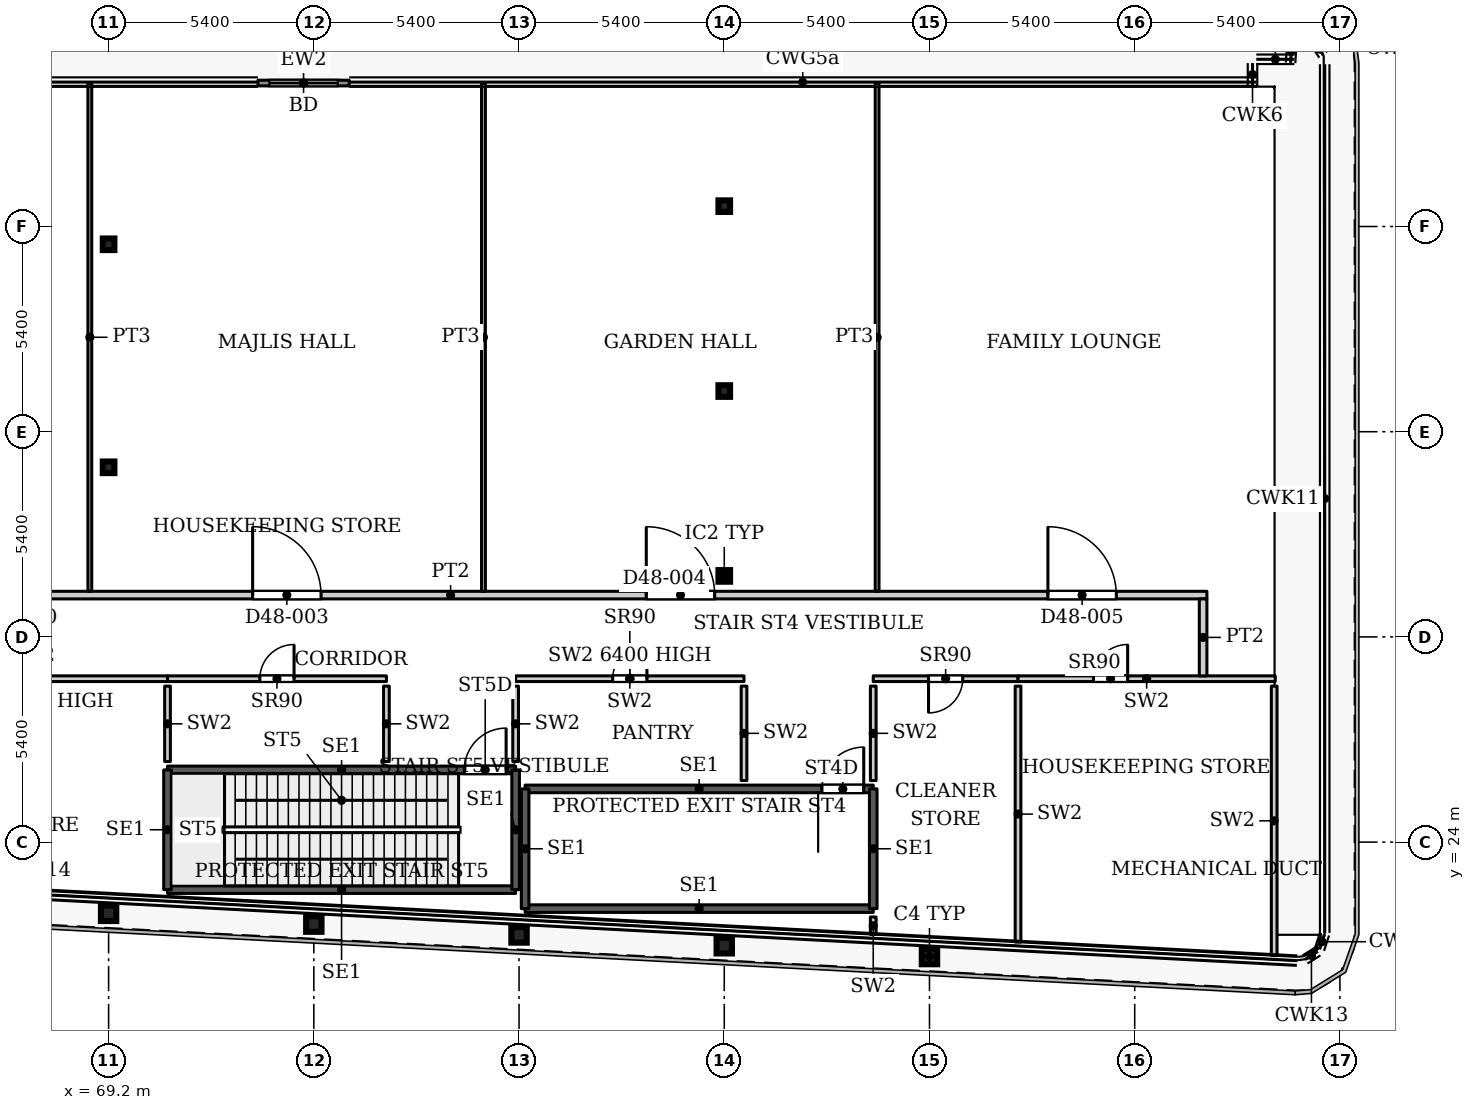
"""IFC4 building model, lengths in metres.
Left out: names, types, materials, properties, quantities, classifications, styles, units other than length and angle.
Written with IfcOpenShell. Run it as: python <this file> out.ifc"""

import sys

from ifc_helpers import new_model, si_unit, direction, frame, frame_2d, origin, origin_2d, place, context, subcontext, project, spatial, rectangle, hollow_rectangle, i_section, extrude, source, transform, mapped, element, fill, save


model = new_model("IFC4")
c1 = context("Model", 3, precision=1e-05, world=origin(), true_north=direction((0.0, 1.0)))
c2 = subcontext(c1, "Body", "Model", "MODEL_VIEW")
j1 = project(units=[si_unit("LENGTHUNIT", "METRE"), si_unit("PLANEANGLEUNIT", "RADIAN")], contexts=[c1])
p1 = place(None, origin())
s1 = spatial("IfcSite", under=j1, at=p1, CompositionType="ELEMENT")
p2 = place(p1, origin())
s2 = spatial("IfcBuilding", under=s1, at=p2, CompositionType="ELEMENT")
p3 = place(p2, frame((0.0, 0.0, 203.3)))
s3 = spatial("IfcBuildingStorey", under=s2, at=p3, CompositionType="ELEMENT", Elevation=203.3)
for number, where, z_axis, x_axis in (
    (1, (90.8, 20.99, 0.0), (0.0, 0.0, 1.0), (1.0, 0.0, 0.0)),
    (2, (85.4, 21.274, 0.0), (0.0, 0.0, 1.0), (1.0, 0.0, 0.0)),
    (3, (80.0, 21.558, 0.0), (0.0, 0.0, 1.0), (1.0, 0.0, 0.0)),
    (4, (74.6, 21.843, 0.0), (0.0, 0.0, 1.0), (1.0, 0.0, 0.0)),
    (5, (69.2, 22.127, 0.0), (0.0, 0.0, 1.0), (1.0, 0.0, 0.0)),
):
    element("IfcColumn", number, at=place(p3, frame(where, z_axis=z_axis, x_axis=x_axis)), inside=s3, PredefinedType="COLUMN", context=c2, shape_type="SweptSolid", body=[
        extrude(i_section(OverallWidth=0.404, OverallDepth=0.407, WebThickness=0.027, FlangeThickness=0.044, FilletRadius=0.012, at=origin_2d()), origin(), (0.0, 0.0, 1.0), 7.8),
    ])
for number, where, z_axis, x_axis in (
    (6, (85.4, 31.005, 0.0), (0.0, 0.0, 1.0), (1.0, 0.0, 0.0)),
    (7, (69.2, 33.863, 0.0), (0.0, 0.0, 1.0), (1.0, 0.0, 0.0)),
    (8, (85.4, 35.87, 0.0), (0.0, 0.0, 1.0), (1.0, 0.0, 0.0)),
    (9, (69.2, 39.732, 0.0), (0.0, 0.0, 1.0), (1.0, 0.0, 0.0)),
    (10, (85.4, 40.735, 0.0), (0.0, 0.0, 1.0), (1.0, 0.0, 0.0)),
):
    element("IfcColumn", number, at=place(p3, frame(where, z_axis=z_axis, x_axis=x_axis)), inside=s3, PredefinedType="COLUMN", context=c2, shape_type="SweptSolid", body=[
        extrude(hollow_rectangle(XDim=0.305, YDim=0.305, WallThickness=0.016, InnerFilletRadius=0.016, OuterFilletRadius=0.032, at=origin_2d()), origin(), (0.0, 0.0, 1.0), 7.8),
    ])
p4 = place(p3, frame((73.13, 43.975, 0.0), z_axis=(0.0, 0.0, 1.0), x_axis=(1.0, 0.0, 0.0)))
e11 = element("IfcWall", 11, at=p4, inside=s3, PredefinedType="SOLIDWALL", context=c2, shape_type="SweptSolid", body=[
    extrude(rectangle(XDim=2.4, YDim=0.15, at=frame_2d((1.2, 0.0))), origin(), (0.0, 0.0, 1.0), 7.65),
])
p5 = place(p4, frame((0.3, 0.0, 0.0)))
e12 = element("IfcOpeningElement", 12, at=p5, cuts=e11, PredefinedType="OPENING", context=c2, shape_type="SweptSolid", body=[
    extrude(rectangle(XDim=1.8, YDim=2.4, at=frame_2d((0.9, 1.2))), frame((0.0, 0.085, 0.0), z_axis=(0.0, -1.0, 0.0), x_axis=(1.0, 0.0, 0.0)), (0.0, 0.0, 1.0), 0.17),
])
p6 = place(p3, frame((80.16, 22.25, 0.0), z_axis=(0.0, 0.0, 1.0), x_axis=(1.0, 0.0, 0.0)))
e13 = element("IfcWall", 13, at=p6, inside=s3, PredefinedType="SHEAR", context=c2, shape_type="SweptSolid", body=[
    extrude(rectangle(XDim=9.16, YDim=0.2, at=frame_2d((4.58, 0.0))), origin(), (0.0, 0.0, 1.0), 7.8),
])
p7 = place(p3, frame((80.16, 25.4, 0.0), z_axis=(0.0, 0.0, 1.0), x_axis=(1.0, 0.0, 0.0)))
e14 = element("IfcWall", 14, at=p7, inside=s3, PredefinedType="SHEAR", context=c2, shape_type="SweptSolid", body=[
    extrude(rectangle(XDim=9.16, YDim=0.2, at=frame_2d((4.58, 0.0))), origin(), (0.0, 0.0, 1.0), 7.8),
])
p8 = place(p7, frame((7.81, 0.0, 0.0)))
e15 = element("IfcOpeningElement", 15, at=p8, cuts=e14, PredefinedType="OPENING", context=c2, shape_type="SweptSolid", body=[
    extrude(rectangle(XDim=1.1, YDim=2.2, at=frame_2d((0.55, 1.1))), frame((0.0, 0.11, 0.0), z_axis=(0.0, -1.0, 0.0), x_axis=(1.0, 0.0, 0.0)), (0.0, 0.0, 1.0), 0.22),
])
for number, where, z_axis, x_axis in (
    (16, (80.16, 22.25, 0.0), (0.0, 0.0, 1.0), (0.0, 1.0, 0.0)),
    (17, (89.32, 22.25, 0.0), (0.0, 0.0, 1.0), (0.0, 1.0, 0.0)),
):
    element("IfcWall", number, at=place(p3, frame(where, z_axis=z_axis, x_axis=x_axis)), inside=s3, PredefinedType="SHEAR", context=c2, shape_type="SweptSolid", body=[
        extrude(rectangle(XDim=3.15, YDim=0.2, at=frame_2d((1.575, 0.0))), origin(), (0.0, 0.0, 1.0), 7.8),
    ])
p9 = place(p3, frame((70.75, 22.75, 0.0), z_axis=(0.0, 0.0, 1.0), x_axis=(1.0, 0.0, 0.0)))
e18 = element("IfcWall", 18, at=p9, inside=s3, PredefinedType="SHEAR", context=c2, shape_type="SweptSolid", body=[
    extrude(rectangle(XDim=9.16, YDim=0.2, at=frame_2d((4.58, 0.0))), origin(), (0.0, 0.0, 1.0), 7.8),
])
p10 = place(p3, frame((70.75, 25.9, 0.0), z_axis=(0.0, 0.0, 1.0), x_axis=(1.0, 0.0, 0.0)))
e19 = element("IfcWall", 19, at=p10, inside=s3, PredefinedType="SHEAR", context=c2, shape_type="SweptSolid", body=[
    extrude(rectangle(XDim=9.16, YDim=0.2, at=frame_2d((4.58, 0.0))), origin(), (0.0, 0.0, 1.0), 7.8),
])
p11 = place(p10, frame((7.81, 0.0, 0.0)))
e20 = element("IfcOpeningElement", 20, at=p11, cuts=e19, PredefinedType="OPENING", context=c2, shape_type="SweptSolid", body=[
    extrude(rectangle(XDim=1.1, YDim=2.2, at=frame_2d((0.55, 1.1))), frame((0.0, 0.11, 0.0), z_axis=(0.0, -1.0, 0.0), x_axis=(1.0, 0.0, 0.0)), (0.0, 0.0, 1.0), 0.22),
])
for number, where, z_axis, x_axis in (
    (21, (70.75, 22.75, 0.0), (0.0, 0.0, 1.0), (0.0, 1.0, 0.0)),
    (22, (79.91, 22.75, 0.0), (0.0, 0.0, 1.0), (0.0, 1.0, 0.0)),
):
    element("IfcWall", number, at=place(p3, frame(where, z_axis=z_axis, x_axis=x_axis)), inside=s3, PredefinedType="SHEAR", context=c2, shape_type="SweptSolid", body=[
        extrude(rectangle(XDim=3.15, YDim=0.2, at=frame_2d((1.575, 0.0))), origin(), (0.0, 0.0, 1.0), 7.8),
    ])
p12 = place(p3, frame((63.611, 28.3, 0.0), z_axis=(0.0, 0.0, 1.0), x_axis=(1.0, 0.0, 0.0)))
e23 = element("IfcWall", 23, at=p12, inside=s3, PredefinedType="PARTITIONING", context=c2, shape_type="SweptSolid", body=[
    extrude(rectangle(XDim=7.139, YDim=0.15, at=frame_2d((3.569, 0.0))), origin(), (0.0, 0.0, 1.0), 6.897),
])
p13 = place(p12, frame((3.119, 0.0, 0.0)))
e24 = element("IfcOpeningElement", 24, at=p13, cuts=e23, PredefinedType="OPENING", context=c2, shape_type="SweptSolid", body=[
    extrude(rectangle(XDim=0.9, YDim=2.2, at=frame_2d((0.45, 1.1))), frame((0.0, 0.085, 0.0), z_axis=(0.0, -1.0, 0.0), x_axis=(1.0, 0.0, 0.0)), (0.0, 0.0, 1.0), 0.17),
])
p14 = place(p3, frame((70.75, 26.12, 0.0), z_axis=(0.0, 0.0, 1.0), x_axis=(0.0, 1.0, 0.0)))
e25 = element("IfcWall", 25, at=p14, inside=s3, PredefinedType="PARTITIONING", context=c2, shape_type="SweptSolid", body=[
    extrude(rectangle(XDim=1.985, YDim=0.15, at=frame_2d((0.992, 0.0))), origin(), (0.0, 0.0, 1.0), 7.8),
])
p15 = place(p3, frame((70.75, 28.3, 0.0), z_axis=(0.0, 0.0, 1.0), x_axis=(1.0, 0.0, 0.0)))
e26 = element("IfcWall", 26, at=p15, inside=s3, PredefinedType="PARTITIONING", context=c2, shape_type="SweptSolid", body=[
    extrude(rectangle(XDim=5.76, YDim=0.15, at=frame_2d((2.88, 0.0))), origin(), (0.0, 0.0, 1.0), 7.8),
])
p16 = place(p15, frame((2.43, 0.0, 0.0)))
e27 = element("IfcOpeningElement", 27, at=p16, cuts=e26, PredefinedType="OPENING", context=c2, shape_type="SweptSolid", body=[
    extrude(rectangle(XDim=0.9, YDim=2.2, at=frame_2d((0.45, 1.1))), frame((0.0, 0.085, 0.0), z_axis=(0.0, -1.0, 0.0), x_axis=(1.0, 0.0, 0.0)), (0.0, 0.0, 1.0), 0.17),
])
p17 = place(p3, frame((76.51, 26.12, 0.0), z_axis=(0.0, 0.0, 1.0), x_axis=(0.0, 1.0, 0.0)))
e28 = element("IfcWall", 28, at=p17, inside=s3, PredefinedType="PARTITIONING", context=c2, shape_type="SweptSolid", body=[
    extrude(rectangle(XDim=1.985, YDim=0.15, at=frame_2d((0.992, 0.0))), origin(), (0.0, 0.0, 1.0), 7.8),
])
p18 = place(p3, frame((79.91, 28.3, 0.0), z_axis=(0.0, 0.0, 1.0), x_axis=(1.0, 0.0, 0.0)))
e29 = element("IfcWall", 29, at=p18, inside=s3, PredefinedType="PARTITIONING", context=c2, shape_type="SweptSolid", body=[
    extrude(rectangle(XDim=6.01, YDim=0.15, at=frame_2d((3.005, 0.0))), origin(), (0.0, 0.0, 1.0), 6.4),
])
p19 = place(p18, frame((2.555, 0.0, 0.0)))
e30 = element("IfcOpeningElement", 30, at=p19, cuts=e29, PredefinedType="OPENING", context=c2, shape_type="SweptSolid", body=[
    extrude(rectangle(XDim=0.9, YDim=2.2, at=frame_2d((0.45, 1.1))), frame((0.0, 0.085, 0.0), z_axis=(0.0, -1.0, 0.0), x_axis=(1.0, 0.0, 0.0)), (0.0, 0.0, 1.0), 0.17),
])
p20 = place(p3, frame((79.91, 26.12, 0.0), z_axis=(0.0, 0.0, 1.0), x_axis=(0.0, 1.0, 0.0)))
e31 = element("IfcWall", 31, at=p20, inside=s3, PredefinedType="PARTITIONING", context=c2, shape_type="SweptSolid", body=[
    extrude(rectangle(XDim=1.985, YDim=0.15, at=frame_2d((0.992, 0.0))), origin(), (0.0, 0.0, 1.0), 7.8),
])
p21 = place(p3, frame((85.92, 25.62, 0.0), z_axis=(0.0, 0.0, 1.0), x_axis=(0.0, 1.0, 0.0)))
e32 = element("IfcWall", 32, at=p21, inside=s3, PredefinedType="PARTITIONING", context=c2, shape_type="SweptSolid", body=[
    extrude(rectangle(XDim=2.485, YDim=0.15, at=frame_2d((1.242, 0.0))), origin(), (0.0, 0.0, 1.0), 7.8),
])
p22 = place(p3, frame((89.32, 28.3, 0.0), z_axis=(0.0, 0.0, 1.0), x_axis=(1.0, 0.0, 0.0)))
e33 = element("IfcWall", 33, at=p22, inside=s3, PredefinedType="PARTITIONING", context=c2, shape_type="SweptSolid", body=[
    extrude(rectangle(XDim=3.81, YDim=0.15, at=frame_2d((1.905, 0.0))), origin(), (0.0, 0.0, 1.0), 7.8),
])
p23 = place(p22, frame((1.455, 0.0, 0.0)))
e34 = element("IfcOpeningElement", 34, at=p23, cuts=e33, PredefinedType="OPENING", context=c2, shape_type="SweptSolid", body=[
    extrude(rectangle(XDim=0.9, YDim=2.2, at=frame_2d((0.45, 1.1))), frame((0.0, 0.085, 0.0), z_axis=(0.0, -1.0, 0.0), x_axis=(1.0, 0.0, 0.0)), (0.0, 0.0, 1.0), 0.17),
])
p24 = place(p3, frame((89.32, 21.571, 0.0), z_axis=(0.0, 0.0, 1.0), x_axis=(0.0, 1.0, 0.0)))
e35 = element("IfcWall", 35, at=p24, inside=s3, PredefinedType="PARTITIONING", context=c2, shape_type="SweptSolid", body=[
    extrude(rectangle(XDim=0.459, YDim=0.15, at=frame_2d((0.229, 0.0))), origin(), (0.0, 0.0, 1.0), 7.8),
])
p25 = place(p3, frame((89.32, 25.62, 0.0), z_axis=(0.0, 0.0, 1.0), x_axis=(0.0, 1.0, 0.0)))
e36 = element("IfcWall", 36, at=p25, inside=s3, PredefinedType="PARTITIONING", context=c2, shape_type="SweptSolid", body=[
    extrude(rectangle(XDim=2.485, YDim=0.15, at=frame_2d((1.242, 0.0))), origin(), (0.0, 0.0, 1.0), 7.8),
])
p26 = place(p3, frame((93.13, 21.37, 0.0), z_axis=(0.0, 0.0, 1.0), x_axis=(0.0, 1.0, 0.0)))
e37 = element("IfcWall", 37, at=p26, inside=s3, PredefinedType="PARTITIONING", context=c2, shape_type="SweptSolid", body=[
    extrude(rectangle(XDim=6.735, YDim=0.15, at=frame_2d((3.367, 0.0))), origin(), (0.0, 0.0, 1.0), 7.8),
])
p27 = place(p3, frame((93.13, 28.3, 0.0), z_axis=(0.0, 0.0, 1.0), x_axis=(1.0, 0.0, 0.0)))
e38 = element("IfcWall", 38, at=p27, inside=s3, PredefinedType="PARTITIONING", context=c2, shape_type="SweptSolid", body=[
    extrude(rectangle(XDim=6.768, YDim=0.15, at=frame_2d((3.384, 0.0))), origin(), (0.0, 0.0, 1.0), 7.8),
])
p28 = place(p27, frame((1.985, 0.0, 0.0)))
e39 = element("IfcOpeningElement", 39, at=p28, cuts=e38, PredefinedType="OPENING", context=c2, shape_type="SweptSolid", body=[
    extrude(rectangle(XDim=0.9, YDim=2.2, at=frame_2d((0.45, 1.1))), frame((0.0, 0.085, 0.0), z_axis=(0.0, -1.0, 0.0), x_axis=(1.0, 0.0, 0.0)), (0.0, 0.0, 1.0), 0.17),
])
p29 = place(p3, frame((99.87, 21.015, 0.0), z_axis=(0.0, 0.0, 1.0), x_axis=(0.0, 1.0, 0.0)))
e40 = element("IfcWall", 40, at=p29, inside=s3, PredefinedType="PARTITIONING", context=c2, shape_type="SweptSolid", body=[
    extrude(rectangle(XDim=7.09, YDim=0.15, at=frame_2d((3.545, 0.0))), origin(), (0.0, 0.0, 1.0), 7.8),
])
p30 = place(p3, frame((58.298, 30.5, 0.0), z_axis=(0.0, 0.0, 1.0), x_axis=(1.0, 0.0, 0.0)))
e41 = element("IfcWall", 41, at=p30, inside=s3, PredefinedType="PARTITIONING", context=c2, shape_type="SweptSolid", body=[
    extrude(rectangle(XDim=39.802, YDim=0.2, at=frame_2d((19.901, 0.0))), origin(), (0.0, 0.0, 1.0), 7.5),
])
p31 = place(p30, frame((4.334, 0.0, 0.0)))
e42 = element("IfcOpeningElement", 42, at=p31, cuts=e41, PredefinedType="OPENING", context=c2, shape_type="SweptSolid", body=[
    extrude(rectangle(XDim=1.8, YDim=2.1, at=frame_2d((0.9, 1.05))), frame((0.0, 0.11, 0.0), z_axis=(0.0, -1.0, 0.0), x_axis=(1.0, 0.0, 0.0)), (0.0, 0.0, 1.0), 0.22),
])
p32 = place(p30, frame((14.692, 0.0, 0.0)))
e43 = element("IfcOpeningElement", 43, at=p32, cuts=e41, PredefinedType="OPENING", context=c2, shape_type="SweptSolid", body=[
    extrude(rectangle(XDim=1.8, YDim=2.1, at=frame_2d((0.9, 1.05))), frame((0.0, 0.11, 0.0), z_axis=(0.0, -1.0, 0.0), x_axis=(1.0, 0.0, 0.0)), (0.0, 0.0, 1.0), 0.22),
])
p33 = place(p30, frame((25.05, 0.0, 0.0)))
e44 = element("IfcOpeningElement", 44, at=p33, cuts=e41, PredefinedType="OPENING", context=c2, shape_type="SweptSolid", body=[
    extrude(rectangle(XDim=1.8, YDim=2.1, at=frame_2d((0.9, 1.05))), frame((0.0, 0.11, 0.0), z_axis=(0.0, -1.0, 0.0), x_axis=(1.0, 0.0, 0.0)), (0.0, 0.0, 1.0), 0.22),
])
p34 = place(p30, frame((35.618, 0.0, 0.0)))
e45 = element("IfcOpeningElement", 45, at=p34, cuts=e41, PredefinedType="OPENING", context=c2, shape_type="SweptSolid", body=[
    extrude(rectangle(XDim=1.8, YDim=2.1, at=frame_2d((0.9, 1.05))), frame((0.0, 0.11, 0.0), z_axis=(0.0, -1.0, 0.0), x_axis=(1.0, 0.0, 0.0)), (0.0, 0.0, 1.0), 0.22),
])
for number, where, z_axis, x_axis in (
    (46, (68.706, 30.6, 0.0), (0.0, 0.0, 1.0), (0.0, 1.0, 0.0)),
    (47, (79.064, 30.6, 0.0), (0.0, 0.0, 1.0), (0.0, 1.0, 0.0)),
    (48, (89.422, 30.6, 0.0), (0.0, 0.0, 1.0), (0.0, 1.0, 0.0)),
):
    element("IfcWall", number, at=place(p3, frame(where, z_axis=z_axis, x_axis=x_axis)), inside=s3, PredefinedType="PARTITIONING", context=c2, shape_type="SweptSolid", body=[
        extrude(rectangle(XDim=13.37, YDim=0.1, at=frame_2d((6.685, 0.0))), origin(), (0.0, 0.0, 1.0), 7.5),
    ])
p35 = place(p3, frame((98.0, 28.374, 0.0), z_axis=(0.0, 0.0, 1.0), x_axis=(0.0, 1.0, 0.0)))
e49 = element("IfcWall", 49, at=p35, inside=s3, PredefinedType="PARTITIONING", context=c2, shape_type="SweptSolid", body=[
    extrude(rectangle(XDim=2.026, YDim=0.2, at=frame_2d((1.013, 0.0))), origin(), (0.0, 0.0, 1.0), 7.5),
])
m1 = source(origin(), c2, "Body", "SweptSolid", [
    extrude(rectangle(XDim=1.8, YDim=2.4, at=frame_2d((0.9, 1.2))), frame((0.0, 0.025, 0.0), z_axis=(0.0, -1.0, 0.0), x_axis=(1.0, 0.0, 0.0)), (0.0, 0.0, 1.0), 0.05),
])
p36 = place(p5, origin())
e50 = element("IfcDoor", 50, at=p36, inside=s3, OperationType="SLIDING_TO_LEFT", PredefinedType="DOOR", context=c2, shape_type="MappedRepresentation", body=[
    mapped(m1, transform((0.0, 0.0, 0.0), x_axis=(1.0, 0.0, 0.0), y_axis=(0.0, 1.0, 0.0), z_axis=(0.0, 0.0, 1.0), scale=1.0)),
])
fill(e12, e50)
m2 = source(origin(), c2, "Body", "SweptSolid", [
    extrude(rectangle(XDim=0.9, YDim=2.2, at=frame_2d((0.45, 1.1))), frame((0.0, 0.025, 0.0), z_axis=(0.0, -1.0, 0.0), x_axis=(1.0, 0.0, 0.0)), (0.0, 0.0, 1.0), 0.05),
])
p37 = place(p16, origin())
e51 = element("IfcDoor", 51, at=p37, inside=s3, OperationType="SINGLE_SWING_LEFT", PredefinedType="DOOR", context=c2, shape_type="MappedRepresentation", body=[
    mapped(m2, transform((0.0, 0.0, 0.0), x_axis=(1.0, 0.0, 0.0), y_axis=(0.0, 1.0, 0.0), z_axis=(0.0, 0.0, 1.0), scale=1.0)),
])
fill(e27, e51)
p38 = place(p19, origin())
e52 = element("IfcDoor", 52, at=p38, inside=s3, OperationType="SINGLE_SWING_LEFT", PredefinedType="DOOR", context=c2, shape_type="MappedRepresentation", body=[
    mapped(m2, transform((0.0, 0.0, 0.0), x_axis=(1.0, 0.0, 0.0), y_axis=(0.0, 1.0, 0.0), z_axis=(0.0, 0.0, 1.0), scale=1.0)),
])
fill(e30, e52)
p39 = place(p23, origin())
e53 = element("IfcDoor", 53, at=p39, inside=s3, OperationType="SINGLE_SWING_RIGHT", PredefinedType="DOOR", context=c2, shape_type="MappedRepresentation", body=[
    mapped(m2, transform((0.0, 0.0, 0.0), x_axis=(1.0, 0.0, 0.0), y_axis=(0.0, 1.0, 0.0), z_axis=(0.0, 0.0, 1.0), scale=1.0)),
])
fill(e34, e53)
p40 = place(p28, origin())
e54 = element("IfcDoor", 54, at=p40, inside=s3, OperationType="SINGLE_SWING_LEFT", PredefinedType="DOOR", context=c2, shape_type="MappedRepresentation", body=[
    mapped(m2, transform((0.0, 0.0, 0.0), x_axis=(1.0, 0.0, 0.0), y_axis=(0.0, 1.0, 0.0), z_axis=(0.0, 0.0, 1.0), scale=1.0)),
])
fill(e39, e54)
m3 = source(origin(), c2, "Body", "SweptSolid", [
    extrude(rectangle(XDim=1.1, YDim=2.2, at=frame_2d((0.55, 1.1))), frame((0.0, 0.025, 0.0), z_axis=(0.0, -1.0, 0.0), x_axis=(1.0, 0.0, 0.0)), (0.0, 0.0, 1.0), 0.05),
])
p41 = place(p8, origin())
e55 = element("IfcDoor", 55, at=p41, inside=s3, OperationType="SINGLE_SWING_LEFT", PredefinedType="DOOR", context=c2, shape_type="MappedRepresentation", body=[
    mapped(m3, transform((0.0, 0.0, 0.0), x_axis=(1.0, 0.0, 0.0), y_axis=(0.0, 1.0, 0.0), z_axis=(0.0, 0.0, 1.0), scale=1.0)),
])
fill(e15, e55)
p42 = place(p11, origin())
e56 = element("IfcDoor", 56, at=p42, inside=s3, OperationType="SINGLE_SWING_LEFT", PredefinedType="DOOR", context=c2, shape_type="MappedRepresentation", body=[
    mapped(m3, transform((0.0, 0.0, 0.0), x_axis=(1.0, 0.0, 0.0), y_axis=(0.0, 1.0, 0.0), z_axis=(0.0, 0.0, 1.0), scale=1.0)),
])
fill(e20, e56)
m4 = source(origin(), c2, "Body", "SweptSolid", [
    extrude(rectangle(XDim=1.8, YDim=2.1, at=frame_2d((0.9, 1.05))), frame((0.0, 0.025, 0.0), z_axis=(0.0, -1.0, 0.0), x_axis=(1.0, 0.0, 0.0)), (0.0, 0.0, 1.0), 0.05),
])
p43 = place(p32, origin())
e57 = element("IfcDoor", 57, at=p43, inside=s3, OperationType="DOUBLE_DOOR_SINGLE_SWING", PredefinedType="DOOR", context=c2, shape_type="MappedRepresentation", body=[
    mapped(m4, transform((0.0, 0.0, 0.0), x_axis=(1.0, 0.0, 0.0), y_axis=(0.0, 1.0, 0.0), z_axis=(0.0, 0.0, 1.0), scale=1.0)),
])
fill(e43, e57)
p44 = place(p33, origin())
e58 = element("IfcDoor", 58, at=p44, inside=s3, OperationType="DOUBLE_DOOR_SINGLE_SWING", PredefinedType="DOOR", context=c2, shape_type="MappedRepresentation", body=[
    mapped(m4, transform((0.0, 0.0, 0.0), x_axis=(1.0, 0.0, 0.0), y_axis=(0.0, 1.0, 0.0), z_axis=(0.0, 0.0, 1.0), scale=1.0)),
])
fill(e44, e58)
p45 = place(p34, origin())
e59 = element("IfcDoor", 59, at=p45, inside=s3, OperationType="DOUBLE_DOOR_SINGLE_SWING", PredefinedType="DOOR", context=c2, shape_type="MappedRepresentation", body=[
    mapped(m4, transform((0.0, 0.0, 0.0), x_axis=(1.0, 0.0, 0.0), y_axis=(0.0, 1.0, 0.0), z_axis=(0.0, 0.0, 1.0), scale=1.0)),
])
fill(e45, e59)
save(model, sys.argv[1])
